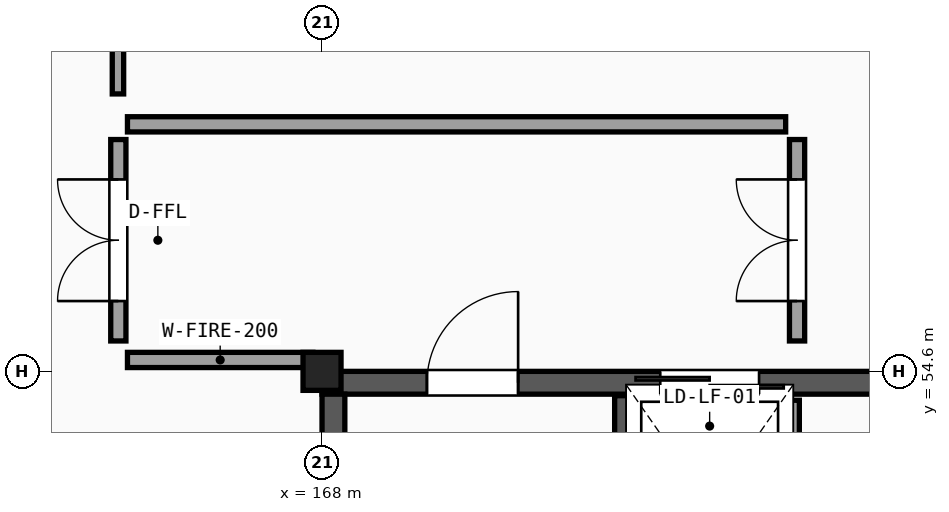
"""IFC4 building model, lengths in metres.
Left out: names, types, materials, properties, quantities, classifications, styles, units other than length and angle.
Written with IfcOpenShell. Run it as: python <this file> out.ifc"""

import sys

from ifc_helpers import new_model, si_unit, direction, frame, frame_2d, origin, origin_2d, place, context, subcontext, project, spatial, rectangle, i_section, extrude, element, fill, save


model = new_model("IFC4")
c1 = context("Model", 3, precision=1e-05, world=origin(), true_north=direction((0.0, 1.0)))
c2 = subcontext(c1, "Body", "Model", "MODEL_VIEW")
j1 = project(units=[si_unit("LENGTHUNIT", "METRE"), si_unit("PLANEANGLEUNIT", "RADIAN")], contexts=[c1])
p1 = place(None, origin())
s1 = spatial("IfcSite", under=j1, at=p1, CompositionType="ELEMENT")
p2 = place(p1, origin())
s2 = spatial("IfcBuilding", under=s1, at=p2, CompositionType="ELEMENT")
p3 = place(p2, frame((0.0, 0.0, 18.9)))
s3 = spatial("IfcBuildingStorey", under=s2, at=p3, CompositionType="ELEMENT", Elevation=18.9)
p4 = place(p3, frame((168.0, 54.6, 0.0), z_axis=(0.0, 0.0, 1.0), x_axis=(1.0, 0.0, 0.0)))
e1 = element("IfcColumn", 1, at=p4, inside=s3, PredefinedType="COLUMN", context=c2, shape_type="SweptSolid", body=[
    extrude(i_section(OverallWidth=0.3, OverallDepth=0.5, WebThickness=0.014, FlangeThickness=0.028, FilletRadius=0.027, at=origin_2d()), origin(), (0.0, 0.0, 1.0), 4.05),
])
p5 = place(p3, frame((168.0, 54.45, 0.0), z_axis=(0.0, 0.0, 1.0), x_axis=(1.0, 0.0, 0.0)))
e2 = element("IfcWall", 2, at=p5, inside=s3, PredefinedType="SHEAR", context=c2, shape_type="SweptSolid", body=[
    extrude(rectangle(XDim=8.4, YDim=0.3, at=frame_2d((4.2, 0.0))), origin(), (0.0, 0.0, 1.0), 3.82),
])
p6 = place(p5, frame((1.38, 0.0, 0.0)))
e3 = element("IfcOpeningElement", 3, at=p6, cuts=e2, PredefinedType="OPENING", context=c2, shape_type="SweptSolid", body=[
    extrude(rectangle(XDim=1.2, YDim=2.15, at=frame_2d((0.6, 1.075))), frame((0.0, 0.16, 0.0), z_axis=(0.0, -1.0, 0.0), x_axis=(1.0, 0.0, 0.0)), (0.0, 0.0, 1.0), 0.32),
])
p7 = place(p5, frame((4.45, 0.0, 0.0)))
e4 = element("IfcOpeningElement", 4, at=p7, cuts=e2, PredefinedType="OPENING", context=c2, shape_type="SweptSolid", body=[
    extrude(rectangle(XDim=1.3, YDim=2.2, at=frame_2d((0.65, 1.1))), frame((0.0, 0.16, 0.0), z_axis=(0.0, -1.0, 0.0), x_axis=(1.0, 0.0, 0.0)), (0.0, 0.0, 1.0), 0.32),
])
p8 = place(p3, frame((168.15, 47.1, 0.0), z_axis=(0.0, 0.0, 1.0), x_axis=(0.0, 1.0, 0.0)))
e5 = element("IfcWall", 5, at=p8, inside=s3, PredefinedType="SHEAR", context=c2, shape_type="SweptSolid", body=[
    extrude(rectangle(XDim=7.2, YDim=0.3, at=frame_2d((3.6, 0.0))), origin(), (0.0, 0.0, 1.0), 3.82),
])
p9 = place(p3, frame((171.95, 47.12, 0.0), z_axis=(0.0, 0.0, 1.0), x_axis=(0.0, 1.0, 0.0)))
e6 = element("IfcWall", 6, at=p9, inside=s3, PredefinedType="SHEAR", context=c2, shape_type="SweptSolid", body=[
    extrude(rectangle(XDim=7.16, YDim=0.2, at=frame_2d((3.58, 0.0))), origin(), (0.0, 0.0, 1.0), 3.82),
])
p10 = place(p3, frame((174.18, 51.48, 0.0), z_axis=(0.0, 0.0, 1.0), x_axis=(0.0, 1.0, 0.0)))
e7 = element("IfcWall", 7, at=p10, inside=s3, PredefinedType="PARTITIONING", context=c2, shape_type="SweptSolid", body=[
    extrude(rectangle(XDim=2.74, YDim=0.2, at=frame_2d((1.37, 0.0))), origin(), (0.0, 0.0, 1.0), 3.25),
])
p11 = place(p3, frame((165.44, 54.75, 0.0), z_axis=(0.0, 0.0, 1.0), x_axis=(1.0, 0.0, 0.0)))
e8 = element("IfcWall", 8, at=p11, inside=s3, PredefinedType="PARTITIONING", context=c2, shape_type="SweptSolid", body=[
    extrude(rectangle(XDim=2.44, YDim=0.2, at=frame_2d((1.22, 0.0))), origin(), (0.0, 0.0, 1.0), 3.25),
])
p12 = place(p3, frame((165.44, 57.85, 0.0), z_axis=(0.0, 0.0, 1.0), x_axis=(1.0, 0.0, 0.0)))
e9 = element("IfcWall", 9, at=p12, inside=s3, PredefinedType="PARTITIONING", context=c2, shape_type="SweptSolid", body=[
    extrude(rectangle(XDim=8.66, YDim=0.2, at=frame_2d((4.33, 0.0))), origin(), (0.0, 0.0, 1.0), 3.25),
])
p13 = place(p3, frame((165.32, 55.0, 0.0), z_axis=(0.0, 0.0, 1.0), x_axis=(0.0, 1.0, 0.0)))
e10 = element("IfcWall", 10, at=p13, inside=s3, PredefinedType="PARTITIONING", context=c2, shape_type="SweptSolid", body=[
    extrude(rectangle(XDim=2.65, YDim=0.2, at=frame_2d((1.325, 0.0))), origin(), (0.0, 0.0, 1.0), 3.25),
])
p14 = place(p13, frame((0.525, 0.0, 0.0)))
e11 = element("IfcOpeningElement", 11, at=p14, cuts=e10, PredefinedType="OPENING", context=c2, shape_type="SweptSolid", body=[
    extrude(rectangle(XDim=1.6, YDim=2.2, at=frame_2d((0.8, 1.1))), frame((0.0, 0.11, 0.0), z_axis=(0.0, -1.0, 0.0), x_axis=(1.0, 0.0, 0.0)), (0.0, 0.0, 1.0), 0.22),
])
p15 = place(p3, frame((174.25, 55.0, 0.0), z_axis=(0.0, 0.0, 1.0), x_axis=(0.0, 1.0, 0.0)))
e12 = element("IfcWall", 12, at=p15, inside=s3, PredefinedType="PARTITIONING", context=c2, shape_type="SweptSolid", body=[
    extrude(rectangle(XDim=2.65, YDim=0.2, at=frame_2d((1.325, 0.0))), origin(), (0.0, 0.0, 1.0), 3.25),
])
p16 = place(p15, frame((0.525, 0.0, 0.0)))
e13 = element("IfcOpeningElement", 13, at=p16, cuts=e12, PredefinedType="OPENING", context=c2, shape_type="SweptSolid", body=[
    extrude(rectangle(XDim=1.6, YDim=2.2, at=frame_2d((0.8, 1.1))), frame((0.0, 0.11, 0.0), z_axis=(0.0, -1.0, 0.0), x_axis=(1.0, 0.0, 0.0)), (0.0, 0.0, 1.0), 0.22),
])
p17 = place(p3, frame((165.315, 58.25, 0.0), z_axis=(0.0, 0.0, 1.0), x_axis=(0.0, 1.0, 0.0)))
e14 = element("IfcWall", 14, at=p17, inside=s3, PredefinedType="PARTITIONING", context=c2, shape_type="SweptSolid", body=[
    extrude(rectangle(XDim=8.65, YDim=0.15, at=frame_2d((4.325, 0.0))), origin(), (0.0, 0.0, 1.0), 3.25),
])
p18 = place(p17, frame((3.475, 0.0, 0.0)))
e15 = element("IfcOpeningElement", 15, at=p18, cuts=e14, PredefinedType="OPENING", context=c2, shape_type="SweptSolid", body=[
    extrude(rectangle(XDim=1.7, YDim=2.3, at=frame_2d((0.85, 1.15))), frame((0.0, 0.085, 0.0), z_axis=(0.0, -1.0, 0.0), x_axis=(1.0, 0.0, 0.0)), (0.0, 0.0, 1.0), 0.17),
])
p19 = place(p6, origin())
e16 = element("IfcDoor", 16, at=p19, inside=s3, OperationType="SINGLE_SWING_RIGHT", PredefinedType="DOOR", context=c2, shape_type="SweptSolid", body=[
    extrude(rectangle(XDim=1.2, YDim=2.15, at=frame_2d((0.6, 1.075))), frame((0.0, 0.025, 0.0), z_axis=(0.0, -1.0, 0.0), x_axis=(1.0, 0.0, 0.0)), (0.0, 0.0, 1.0), 0.05),
])
fill(e3, e16)
p20 = place(p7, origin())
e17 = element("IfcDoor", 17, at=p20, inside=s3, OperationType="DOUBLE_DOOR_SLIDING", PredefinedType="DOOR", context=c2, shape_type="SweptSolid", body=[
    extrude(rectangle(XDim=1.3, YDim=2.2, at=frame_2d((0.65, 1.1))), frame((0.0, 0.025, 0.0), z_axis=(0.0, -1.0, 0.0), x_axis=(1.0, 0.0, 0.0)), (0.0, 0.0, 1.0), 0.05),
])
fill(e4, e17)
p21 = place(p14, origin())
e18 = element("IfcDoor", 18, at=p21, inside=s3, OperationType="DOUBLE_DOOR_SINGLE_SWING", PredefinedType="DOOR", context=c2, shape_type="SweptSolid", body=[
    extrude(rectangle(XDim=1.6, YDim=2.2, at=frame_2d((0.8, 1.1))), frame((0.0, 0.025, 0.0), z_axis=(0.0, -1.0, 0.0), x_axis=(1.0, 0.0, 0.0)), (0.0, 0.0, 1.0), 0.05),
])
fill(e11, e18)
p22 = place(p16, origin())
e19 = element("IfcDoor", 19, at=p22, inside=s3, OperationType="DOUBLE_DOOR_SINGLE_SWING", PredefinedType="DOOR", context=c2, shape_type="SweptSolid", body=[
    extrude(rectangle(XDim=1.6, YDim=2.2, at=frame_2d((0.8, 1.1))), frame((0.0, 0.025, 0.0), z_axis=(0.0, -1.0, 0.0), x_axis=(1.0, 0.0, 0.0)), (0.0, 0.0, 1.0), 0.05),
])
fill(e13, e19)
save(model, sys.argv[1])
